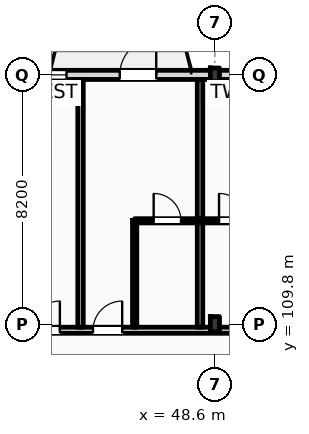
"""IFC4 building model, lengths in metres.
Left out: names, types, materials, properties, quantities, classifications, styles, units other than length and angle.
Written with IfcOpenShell. Run it as: python <this file> out.ifc"""

import sys

from ifc_helpers import new_model, si_unit, direction, frame, frame_2d, origin, origin_2d, place, context, subcontext, project, spatial, rectangle, i_section, extrude, element, fill, save


model = new_model("IFC4")
c1 = context("Model", 3, precision=1e-05, world=origin(), true_north=direction((0.0, 1.0)))
c2 = subcontext(c1, "Body", "Model", "MODEL_VIEW")
j1 = project(units=[si_unit("LENGTHUNIT", "METRE"), si_unit("PLANEANGLEUNIT", "RADIAN")], contexts=[c1])
p1 = place(None, origin())
s1 = spatial("IfcSite", under=j1, at=p1, CompositionType="ELEMENT")
p2 = place(p1, origin())
s2 = spatial("IfcBuilding", under=s1, at=p2, CompositionType="ELEMENT")
p3 = place(p2, frame((0.0, 0.0, 24.6)))
s3 = spatial("IfcBuildingStorey", under=s2, at=p3, CompositionType="ELEMENT", Elevation=24.6)
p4 = place(p3, frame((48.6, 109.8, 0.0), z_axis=(0.0, 0.0, 1.0), x_axis=(1.0, 0.0, 0.0)))
e1 = element("IfcColumn", 1, at=p4, inside=s3, PredefinedType="COLUMN", context=c2, shape_type="SweptSolid", body=[
    extrude(i_section(OverallWidth=0.3, OverallDepth=0.5, WebThickness=0.014, FlangeThickness=0.028, FilletRadius=0.027, at=origin_2d()), origin(), (0.0, 0.0, 1.0), 3.6),
])
p5 = place(p3, frame((48.6, 118.0, 0.0), z_axis=(0.0, 0.0, 1.0), x_axis=(1.0, 0.0, 0.0)))
e2 = element("IfcColumn", 2, at=p5, inside=s3, PredefinedType="COLUMN", context=c2, shape_type="SweptSolid", body=[
    extrude(i_section(OverallWidth=0.3, OverallDepth=0.45, WebThickness=0.014, FlangeThickness=0.026, FilletRadius=0.027, at=origin_2d()), origin(), (0.0, 0.0, 1.0), 3.6),
])
p6 = place(p3, frame((22.5, 118.0, 0.0), z_axis=(0.0, 0.0, 1.0), x_axis=(1.0, 0.0, 0.0)))
e3 = element("IfcWall", 3, at=p6, inside=s3, PredefinedType="STANDARD", context=c2, shape_type="SweptSolid", body=[
    extrude(rectangle(XDim=97.5, YDim=0.3, at=frame_2d((48.75, 0.0))), origin(), (0.0, 0.0, 1.0), 2.78),
])
p7 = place(p6, frame((0.91, 0.0, 0.9)))
e4 = element("IfcOpeningElement", 4, at=p7, cuts=e3, PredefinedType="OPENING", context=c2, shape_type="SweptSolid", body=[
    extrude(rectangle(XDim=0.9, YDim=1.7, at=frame_2d((0.45, 0.85))), frame((0.0, 0.16, 0.0), z_axis=(0.0, -1.0, 0.0), x_axis=(1.0, 0.0, 0.0)), (0.0, 0.0, 1.0), 0.32),
])
p8 = place(p6, frame((6.275, 0.0, 0.0)))
e5 = element("IfcOpeningElement", 5, at=p8, cuts=e3, PredefinedType="OPENING", context=c2, shape_type="SweptSolid", body=[
    extrude(rectangle(XDim=1.2, YDim=2.25, at=frame_2d((0.6, 1.125))), frame((0.0, 0.16, 0.0), z_axis=(0.0, -1.0, 0.0), x_axis=(1.0, 0.0, 0.0)), (0.0, 0.0, 1.0), 0.32),
])
p9 = place(p6, frame((11.42, 0.0, 0.9)))
e6 = element("IfcOpeningElement", 6, at=p9, cuts=e3, PredefinedType="OPENING", context=c2, shape_type="SweptSolid", body=[
    extrude(rectangle(XDim=1.35, YDim=1.7, at=frame_2d((0.675, 0.85))), frame((0.0, 0.16, 0.0), z_axis=(0.0, -1.0, 0.0), x_axis=(1.0, 0.0, 0.0)), (0.0, 0.0, 1.0), 0.32),
])
p10 = place(p6, frame((14.345, 0.0, 0.9)))
e7 = element("IfcOpeningElement", 7, at=p10, cuts=e3, PredefinedType="OPENING", context=c2, shape_type="SweptSolid", body=[
    extrude(rectangle(XDim=1.8, YDim=1.7, at=frame_2d((0.9, 0.85))), frame((0.0, 0.16, 0.0), z_axis=(0.0, -1.0, 0.0), x_axis=(1.0, 0.0, 0.0)), (0.0, 0.0, 1.0), 0.32),
])
p11 = place(p6, frame((19.27, 0.0, 0.9)))
e8 = element("IfcOpeningElement", 8, at=p11, cuts=e3, PredefinedType="OPENING", context=c2, shape_type="SweptSolid", body=[
    extrude(rectangle(XDim=1.95, YDim=1.7, at=frame_2d((0.975, 0.85))), frame((0.0, 0.16, 0.0), z_axis=(0.0, -1.0, 0.0), x_axis=(1.0, 0.0, 0.0)), (0.0, 0.0, 1.0), 0.32),
])
p12 = place(p6, frame((22.97, 0.0, 0.0)))
e9 = element("IfcOpeningElement", 9, at=p12, cuts=e3, PredefinedType="OPENING", context=c2, shape_type="SweptSolid", body=[
    extrude(rectangle(XDim=1.2, YDim=2.25, at=frame_2d((0.6, 1.125))), frame((0.0, 0.16, 0.0), z_axis=(0.0, -1.0, 0.0), x_axis=(1.0, 0.0, 0.0)), (0.0, 0.0, 1.0), 0.32),
])
p13 = place(p6, frame((26.92, 0.0, 0.9)))
e10 = element("IfcOpeningElement", 10, at=p13, cuts=e3, PredefinedType="OPENING", context=c2, shape_type="SweptSolid", body=[
    extrude(rectangle(XDim=2.25, YDim=1.7, at=frame_2d((1.125, 0.85))), frame((0.0, 0.16, 0.0), z_axis=(0.0, -1.0, 0.0), x_axis=(1.0, 0.0, 0.0)), (0.0, 0.0, 1.0), 0.32),
])
p14 = place(p6, frame((30.645, 0.0, 0.9)))
e11 = element("IfcOpeningElement", 11, at=p14, cuts=e3, PredefinedType="OPENING", context=c2, shape_type="SweptSolid", body=[
    extrude(rectangle(XDim=2.4, YDim=1.7, at=frame_2d((1.2, 0.85))), frame((0.0, 0.16, 0.0), z_axis=(0.0, -1.0, 0.0), x_axis=(1.0, 0.0, 0.0)), (0.0, 0.0, 1.0), 0.32),
])
p15 = place(p6, frame((36.71, 0.0, 0.0)))
e12 = element("IfcOpeningElement", 12, at=p15, cuts=e3, PredefinedType="OPENING", context=c2, shape_type="SweptSolid", body=[
    extrude(rectangle(XDim=1.2, YDim=2.25, at=frame_2d((0.6, 1.125))), frame((0.0, 0.16, 0.0), z_axis=(0.0, -1.0, 0.0), x_axis=(1.0, 0.0, 0.0)), (0.0, 0.0, 1.0), 0.32),
])
p16 = place(p6, frame((39.17, 0.0, 0.0)))
e13 = element("IfcOpeningElement", 13, at=p16, cuts=e3, PredefinedType="OPENING", context=c2, shape_type="SweptSolid", body=[
    extrude(rectangle(XDim=1.2, YDim=2.25, at=frame_2d((0.6, 1.125))), frame((0.0, 0.16, 0.0), z_axis=(0.0, -1.0, 0.0), x_axis=(1.0, 0.0, 0.0)), (0.0, 0.0, 1.0), 0.32),
])
p17 = place(p6, frame((43.22, 0.0, 0.9)))
e14 = element("IfcOpeningElement", 14, at=p17, cuts=e3, PredefinedType="OPENING", context=c2, shape_type="SweptSolid", body=[
    extrude(rectangle(XDim=2.85, YDim=1.7, at=frame_2d((1.425, 0.85))), frame((0.0, 0.16, 0.0), z_axis=(0.0, -1.0, 0.0), x_axis=(1.0, 0.0, 0.0)), (0.0, 0.0, 1.0), 0.32),
])
p18 = place(p6, frame((47.29, 0.0, 0.9)))
e15 = element("IfcOpeningElement", 15, at=p18, cuts=e3, PredefinedType="OPENING", context=c2, shape_type="SweptSolid", body=[
    extrude(rectangle(XDim=1.35, YDim=1.7, at=frame_2d((0.675, 0.85))), frame((0.0, 0.16, 0.0), z_axis=(0.0, -1.0, 0.0), x_axis=(1.0, 0.0, 0.0)), (0.0, 0.0, 1.0), 0.32),
])
p19 = place(p6, frame((52.91, 0.0, 0.0)))
e16 = element("IfcOpeningElement", 16, at=p19, cuts=e3, PredefinedType="OPENING", context=c2, shape_type="SweptSolid", body=[
    extrude(rectangle(XDim=1.2, YDim=2.25, at=frame_2d((0.6, 1.125))), frame((0.0, 0.16, 0.0), z_axis=(0.0, -1.0, 0.0), x_axis=(1.0, 0.0, 0.0)), (0.0, 0.0, 1.0), 0.32),
])
p20 = place(p6, frame((55.69, 0.0, 0.9)))
e17 = element("IfcOpeningElement", 17, at=p20, cuts=e3, PredefinedType="OPENING", context=c2, shape_type="SweptSolid", body=[
    extrude(rectangle(XDim=0.9, YDim=1.7, at=frame_2d((0.45, 0.85))), frame((0.0, 0.16, 0.0), z_axis=(0.0, -1.0, 0.0), x_axis=(1.0, 0.0, 0.0)), (0.0, 0.0, 1.0), 0.32),
])
p21 = place(p6, frame((59.82, 0.0, 0.9)))
e18 = element("IfcOpeningElement", 18, at=p21, cuts=e3, PredefinedType="OPENING", context=c2, shape_type="SweptSolid", body=[
    extrude(rectangle(XDim=3.25, YDim=1.7, at=frame_2d((1.625, 0.85))), frame((0.0, 0.16, 0.0), z_axis=(0.0, -1.0, 0.0), x_axis=(1.0, 0.0, 0.0)), (0.0, 0.0, 1.0), 0.32),
])
p22 = place(p6, frame((65.89, 0.0, 0.9)))
e19 = element("IfcOpeningElement", 19, at=p22, cuts=e3, PredefinedType="OPENING", context=c2, shape_type="SweptSolid", body=[
    extrude(rectangle(XDim=1.1, YDim=1.7, at=frame_2d((0.55, 0.85))), frame((0.0, 0.16, 0.0), z_axis=(0.0, -1.0, 0.0), x_axis=(1.0, 0.0, 0.0)), (0.0, 0.0, 1.0), 0.32),
])
p23 = place(p6, frame((69.245, 0.0, 0.0)))
e20 = element("IfcOpeningElement", 20, at=p23, cuts=e3, PredefinedType="OPENING", context=c2, shape_type="SweptSolid", body=[
    extrude(rectangle(XDim=1.2, YDim=2.25, at=frame_2d((0.6, 1.125))), frame((0.0, 0.16, 0.0), z_axis=(0.0, -1.0, 0.0), x_axis=(1.0, 0.0, 0.0)), (0.0, 0.0, 1.0), 0.32),
])
p24 = place(p6, frame((73.69, 0.0, 0.9)))
e21 = element("IfcOpeningElement", 21, at=p24, cuts=e3, PredefinedType="OPENING", context=c2, shape_type="SweptSolid", body=[
    extrude(rectangle(XDim=1.8, YDim=1.7, at=frame_2d((0.9, 0.85))), frame((0.0, 0.16, 0.0), z_axis=(0.0, -1.0, 0.0), x_axis=(1.0, 0.0, 0.0)), (0.0, 0.0, 1.0), 0.32),
])
p25 = place(p6, frame((76.62, 0.0, 0.9)))
e22 = element("IfcOpeningElement", 22, at=p25, cuts=e3, PredefinedType="OPENING", context=c2, shape_type="SweptSolid", body=[
    extrude(rectangle(XDim=3.25, YDim=1.7, at=frame_2d((1.625, 0.85))), frame((0.0, 0.16, 0.0), z_axis=(0.0, -1.0, 0.0), x_axis=(1.0, 0.0, 0.0)), (0.0, 0.0, 1.0), 0.32),
])
p26 = place(p6, frame((81.895, 0.0, 0.9)))
e23 = element("IfcOpeningElement", 23, at=p26, cuts=e3, PredefinedType="OPENING", context=c2, shape_type="SweptSolid", body=[
    extrude(rectangle(XDim=1.1, YDim=1.5, at=frame_2d((0.55, 0.75))), frame((0.0, 0.16, 0.0), z_axis=(0.0, -1.0, 0.0), x_axis=(1.0, 0.0, 0.0)), (0.0, 0.0, 1.0), 0.32),
])
p27 = place(p6, frame((86.02, 0.0, 0.9)))
e24 = element("IfcOpeningElement", 24, at=p27, cuts=e3, PredefinedType="OPENING", context=c2, shape_type="SweptSolid", body=[
    extrude(rectangle(XDim=1.25, YDim=1.6, at=frame_2d((0.625, 0.8))), frame((0.0, 0.16, 0.0), z_axis=(0.0, -1.0, 0.0), x_axis=(1.0, 0.0, 0.0)), (0.0, 0.0, 1.0), 0.32),
])
p28 = place(p6, frame((90.145, 0.0, 0.9)))
e25 = element("IfcOpeningElement", 25, at=p28, cuts=e3, PredefinedType="OPENING", context=c2, shape_type="SweptSolid", body=[
    extrude(rectangle(XDim=1.4, YDim=1.7, at=frame_2d((0.7, 0.85))), frame((0.0, 0.16, 0.0), z_axis=(0.0, -1.0, 0.0), x_axis=(1.0, 0.0, 0.0)), (0.0, 0.0, 1.0), 0.32),
])
p29 = place(p6, frame((94.155, 0.0, 0.9)))
e26 = element("IfcOpeningElement", 26, at=p29, cuts=e3, PredefinedType="OPENING", context=c2, shape_type="SweptSolid", body=[
    extrude(rectangle(XDim=1.6, YDim=1.7, at=frame_2d((0.8, 0.85))), frame((0.0, 0.16, 0.0), z_axis=(0.0, -1.0, 0.0), x_axis=(1.0, 0.0, 0.0)), (0.0, 0.0, 1.0), 0.32),
])
p30 = place(p3, frame((10.65, 109.6, 0.0), z_axis=(0.0, 0.0, 1.0), x_axis=(1.0, 0.0, 0.0)))
e27 = element("IfcWall", 27, at=p30, inside=s3, PredefinedType="PARTITIONING", context=c2, shape_type="SweptSolid", body=[
    extrude(rectangle(XDim=109.21, YDim=0.2, at=frame_2d((54.605, 0.0))), origin(), (0.0, 0.0, 1.0), 2.78),
])
p31 = place(p30, frame((12.705, 0.0, 0.0)))
e28 = element("IfcOpeningElement", 28, at=p31, cuts=e27, PredefinedType="OPENING", context=c2, shape_type="SweptSolid", body=[
    extrude(rectangle(XDim=1.02, YDim=2.2, at=frame_2d((0.51, 1.1))), frame((0.0, 0.11, 0.0), z_axis=(0.0, -1.0, 0.0), x_axis=(1.0, 0.0, 0.0)), (0.0, 0.0, 1.0), 0.22),
])
p32 = place(p30, frame((19.26, 0.0, 0.0)))
e29 = element("IfcOpeningElement", 29, at=p32, cuts=e27, PredefinedType="OPENING", context=c2, shape_type="SweptSolid", body=[
    extrude(rectangle(XDim=1.02, YDim=2.2, at=frame_2d((0.51, 1.1))), frame((0.0, 0.11, 0.0), z_axis=(0.0, -1.0, 0.0), x_axis=(1.0, 0.0, 0.0)), (0.0, 0.0, 1.0), 0.22),
])
p33 = place(p30, frame((23.71, 0.0, 0.0)))
e30 = element("IfcOpeningElement", 30, at=p33, cuts=e27, PredefinedType="OPENING", context=c2, shape_type="SweptSolid", body=[
    extrude(rectangle(XDim=1.02, YDim=2.2, at=frame_2d((0.51, 1.1))), frame((0.0, 0.11, 0.0), z_axis=(0.0, -1.0, 0.0), x_axis=(1.0, 0.0, 0.0)), (0.0, 0.0, 1.0), 0.22),
])
p34 = place(p30, frame((27.66, 0.0, 0.0)))
e31 = element("IfcOpeningElement", 31, at=p34, cuts=e27, PredefinedType="OPENING", context=c2, shape_type="SweptSolid", body=[
    extrude(rectangle(XDim=1.02, YDim=2.2, at=frame_2d((0.51, 1.1))), frame((0.0, 0.11, 0.0), z_axis=(0.0, -1.0, 0.0), x_axis=(1.0, 0.0, 0.0)), (0.0, 0.0, 1.0), 0.22),
])
p35 = place(p30, frame((31.89, 0.0, 0.0)))
e32 = element("IfcOpeningElement", 32, at=p35, cuts=e27, PredefinedType="OPENING", context=c2, shape_type="SweptSolid", body=[
    extrude(rectangle(XDim=0.96, YDim=2.2, at=frame_2d((0.48, 1.1))), frame((0.0, 0.11, 0.0), z_axis=(0.0, -1.0, 0.0), x_axis=(1.0, 0.0, 0.0)), (0.0, 0.0, 1.0), 0.22),
])
p36 = place(p30, frame((33.94, 0.0, 0.0)))
e33 = element("IfcOpeningElement", 33, at=p36, cuts=e27, PredefinedType="OPENING", context=c2, shape_type="SweptSolid", body=[
    extrude(rectangle(XDim=0.96, YDim=2.2, at=frame_2d((0.48, 1.1))), frame((0.0, 0.11, 0.0), z_axis=(0.0, -1.0, 0.0), x_axis=(1.0, 0.0, 0.0)), (0.0, 0.0, 1.0), 0.22),
])
p37 = place(p30, frame((40.29, 0.0, 0.0)))
e34 = element("IfcOpeningElement", 34, at=p37, cuts=e27, PredefinedType="OPENING", context=c2, shape_type="SweptSolid", body=[
    extrude(rectangle(XDim=0.96, YDim=2.2, at=frame_2d((0.48, 1.1))), frame((0.0, 0.11, 0.0), z_axis=(0.0, -1.0, 0.0), x_axis=(1.0, 0.0, 0.0)), (0.0, 0.0, 1.0), 0.22),
])
p38 = place(p30, frame((42.34, 0.0, 0.0)))
e35 = element("IfcOpeningElement", 35, at=p38, cuts=e27, PredefinedType="OPENING", context=c2, shape_type="SweptSolid", body=[
    extrude(rectangle(XDim=0.96, YDim=2.2, at=frame_2d((0.48, 1.1))), frame((0.0, 0.11, 0.0), z_axis=(0.0, -1.0, 0.0), x_axis=(1.0, 0.0, 0.0)), (0.0, 0.0, 1.0), 0.22),
])
p39 = place(p30, frame((48.69, 0.0, 0.0)))
e36 = element("IfcOpeningElement", 36, at=p39, cuts=e27, PredefinedType="OPENING", context=c2, shape_type="SweptSolid", body=[
    extrude(rectangle(XDim=0.96, YDim=2.2, at=frame_2d((0.48, 1.1))), frame((0.0, 0.11, 0.0), z_axis=(0.0, -1.0, 0.0), x_axis=(1.0, 0.0, 0.0)), (0.0, 0.0, 1.0), 0.22),
])
p40 = place(p30, frame((50.74, 0.0, 0.0)))
e37 = element("IfcOpeningElement", 37, at=p40, cuts=e27, PredefinedType="OPENING", context=c2, shape_type="SweptSolid", body=[
    extrude(rectangle(XDim=0.96, YDim=2.2, at=frame_2d((0.48, 1.1))), frame((0.0, 0.11, 0.0), z_axis=(0.0, -1.0, 0.0), x_axis=(1.0, 0.0, 0.0)), (0.0, 0.0, 1.0), 0.22),
])
p41 = place(p30, frame((57.09, 0.0, 0.0)))
e38 = element("IfcOpeningElement", 38, at=p41, cuts=e27, PredefinedType="OPENING", context=c2, shape_type="SweptSolid", body=[
    extrude(rectangle(XDim=0.96, YDim=2.2, at=frame_2d((0.48, 1.1))), frame((0.0, 0.11, 0.0), z_axis=(0.0, -1.0, 0.0), x_axis=(1.0, 0.0, 0.0)), (0.0, 0.0, 1.0), 0.22),
])
p42 = place(p30, frame((59.14, 0.0, 0.0)))
e39 = element("IfcOpeningElement", 39, at=p42, cuts=e27, PredefinedType="OPENING", context=c2, shape_type="SweptSolid", body=[
    extrude(rectangle(XDim=0.96, YDim=2.2, at=frame_2d((0.48, 1.1))), frame((0.0, 0.11, 0.0), z_axis=(0.0, -1.0, 0.0), x_axis=(1.0, 0.0, 0.0)), (0.0, 0.0, 1.0), 0.22),
])
p43 = place(p30, frame((65.49, 0.0, 0.0)))
e40 = element("IfcOpeningElement", 40, at=p43, cuts=e27, PredefinedType="OPENING", context=c2, shape_type="SweptSolid", body=[
    extrude(rectangle(XDim=0.96, YDim=2.2, at=frame_2d((0.48, 1.1))), frame((0.0, 0.11, 0.0), z_axis=(0.0, -1.0, 0.0), x_axis=(1.0, 0.0, 0.0)), (0.0, 0.0, 1.0), 0.22),
])
p44 = place(p30, frame((67.54, 0.0, 0.0)))
e41 = element("IfcOpeningElement", 41, at=p44, cuts=e27, PredefinedType="OPENING", context=c2, shape_type="SweptSolid", body=[
    extrude(rectangle(XDim=0.96, YDim=2.2, at=frame_2d((0.48, 1.1))), frame((0.0, 0.11, 0.0), z_axis=(0.0, -1.0, 0.0), x_axis=(1.0, 0.0, 0.0)), (0.0, 0.0, 1.0), 0.22),
])
p45 = place(p30, frame((73.89, 0.0, 0.0)))
e42 = element("IfcOpeningElement", 42, at=p45, cuts=e27, PredefinedType="OPENING", context=c2, shape_type="SweptSolid", body=[
    extrude(rectangle(XDim=0.96, YDim=2.2, at=frame_2d((0.48, 1.1))), frame((0.0, 0.11, 0.0), z_axis=(0.0, -1.0, 0.0), x_axis=(1.0, 0.0, 0.0)), (0.0, 0.0, 1.0), 0.22),
])
p46 = place(p30, frame((78.09, 0.0, 0.0)))
e43 = element("IfcOpeningElement", 43, at=p46, cuts=e27, PredefinedType="OPENING", context=c2, shape_type="SweptSolid", body=[
    extrude(rectangle(XDim=0.96, YDim=2.2, at=frame_2d((0.48, 1.1))), frame((0.0, 0.11, 0.0), z_axis=(0.0, -1.0, 0.0), x_axis=(1.0, 0.0, 0.0)), (0.0, 0.0, 1.0), 0.22),
])
p47 = place(p30, frame((82.29, 0.0, 0.0)))
e44 = element("IfcOpeningElement", 44, at=p47, cuts=e27, PredefinedType="OPENING", context=c2, shape_type="SweptSolid", body=[
    extrude(rectangle(XDim=0.96, YDim=2.2, at=frame_2d((0.48, 1.1))), frame((0.0, 0.11, 0.0), z_axis=(0.0, -1.0, 0.0), x_axis=(1.0, 0.0, 0.0)), (0.0, 0.0, 1.0), 0.22),
])
p48 = place(p30, frame((86.49, 0.0, 0.0)))
e45 = element("IfcOpeningElement", 45, at=p48, cuts=e27, PredefinedType="OPENING", context=c2, shape_type="SweptSolid", body=[
    extrude(rectangle(XDim=0.96, YDim=2.2, at=frame_2d((0.48, 1.1))), frame((0.0, 0.11, 0.0), z_axis=(0.0, -1.0, 0.0), x_axis=(1.0, 0.0, 0.0)), (0.0, 0.0, 1.0), 0.22),
])
p49 = place(p30, frame((88.54, 0.0, 0.0)))
e46 = element("IfcOpeningElement", 46, at=p49, cuts=e27, PredefinedType="OPENING", context=c2, shape_type="SweptSolid", body=[
    extrude(rectangle(XDim=0.96, YDim=2.2, at=frame_2d((0.48, 1.1))), frame((0.0, 0.11, 0.0), z_axis=(0.0, -1.0, 0.0), x_axis=(1.0, 0.0, 0.0)), (0.0, 0.0, 1.0), 0.22),
])
p50 = place(p30, frame((94.89, 0.0, 0.0)))
e47 = element("IfcOpeningElement", 47, at=p50, cuts=e27, PredefinedType="OPENING", context=c2, shape_type="SweptSolid", body=[
    extrude(rectangle(XDim=0.96, YDim=2.2, at=frame_2d((0.48, 1.1))), frame((0.0, 0.11, 0.0), z_axis=(0.0, -1.0, 0.0), x_axis=(1.0, 0.0, 0.0)), (0.0, 0.0, 1.0), 0.22),
])
p51 = place(p30, frame((96.94, 0.0, 0.0)))
e48 = element("IfcOpeningElement", 48, at=p51, cuts=e27, PredefinedType="OPENING", context=c2, shape_type="SweptSolid", body=[
    extrude(rectangle(XDim=0.96, YDim=2.2, at=frame_2d((0.48, 1.1))), frame((0.0, 0.11, 0.0), z_axis=(0.0, -1.0, 0.0), x_axis=(1.0, 0.0, 0.0)), (0.0, 0.0, 1.0), 0.22),
])
p52 = place(p30, frame((103.29, 0.0, 0.0)))
e49 = element("IfcOpeningElement", 49, at=p52, cuts=e27, PredefinedType="OPENING", context=c2, shape_type="SweptSolid", body=[
    extrude(rectangle(XDim=0.96, YDim=2.2, at=frame_2d((0.48, 1.1))), frame((0.0, 0.11, 0.0), z_axis=(0.0, -1.0, 0.0), x_axis=(1.0, 0.0, 0.0)), (0.0, 0.0, 1.0), 0.22),
])
p53 = place(p30, frame((105.25, 0.0, 0.0)))
e50 = element("IfcOpeningElement", 50, at=p53, cuts=e27, PredefinedType="OPENING", context=c2, shape_type="SweptSolid", body=[
    extrude(rectangle(XDim=0.96, YDim=2.2, at=frame_2d((0.48, 1.1))), frame((0.0, 0.11, 0.0), z_axis=(0.0, -1.0, 0.0), x_axis=(1.0, 0.0, 0.0)), (0.0, 0.0, 1.0), 0.22),
])
p54 = place(p30, frame((2.716, 0.0, 0.0)))
e51 = element("IfcOpeningElement", 51, at=p54, cuts=e27, PredefinedType="OPENING", context=c2, shape_type="SweptSolid", body=[
    extrude(rectangle(XDim=1.35, YDim=2.25, at=frame_2d((0.675, 1.125))), frame((0.0, 0.11, 0.0), z_axis=(0.0, -1.0, 0.0), x_axis=(1.0, 0.0, 0.0)), (0.0, 0.0, 1.0), 0.22),
])
p55 = place(p30, frame((6.65, 0.0, 0.0)))
e52 = element("IfcOpeningElement", 52, at=p55, cuts=e27, PredefinedType="OPENING", context=c2, shape_type="SweptSolid", body=[
    extrude(rectangle(XDim=1.35, YDim=2.25, at=frame_2d((0.675, 1.125))), frame((0.0, 0.11, 0.0), z_axis=(0.0, -1.0, 0.0), x_axis=(1.0, 0.0, 0.0)), (0.0, 0.0, 1.0), 0.22),
])
p56 = place(p30, frame((10.583, 0.0, 0.0)))
e53 = element("IfcOpeningElement", 53, at=p56, cuts=e27, PredefinedType="OPENING", context=c2, shape_type="SweptSolid", body=[
    extrude(rectangle(XDim=1.35, YDim=2.25, at=frame_2d((0.675, 1.125))), frame((0.0, 0.11, 0.0), z_axis=(0.0, -1.0, 0.0), x_axis=(1.0, 0.0, 0.0)), (0.0, 0.0, 1.0), 0.22),
])
for number, where, z_axis, x_axis in (
    (54, (44.18, 109.7, 0.0), (0.0, 0.0, 1.0), (0.0, 1.0, 0.0)),
    (55, (48.11, 109.7, 0.0), (0.0, 0.0, 1.0), (0.0, 1.0, 0.0)),
):
    element("IfcWall", number, at=place(p3, frame(where, z_axis=z_axis, x_axis=x_axis)), inside=s3, PredefinedType="PARTITIONING", context=c2, shape_type="SweptSolid", body=[
        extrude(rectangle(XDim=8.15, YDim=0.18, at=frame_2d((4.075, 0.0))), origin(), (0.0, 0.0, 1.0), 3.34),
    ])
p57 = place(p3, frame((45.96, 109.7, 0.0), z_axis=(0.0, 0.0, 1.0), x_axis=(0.0, 1.0, 0.0)))
e56 = element("IfcWall", 56, at=p57, inside=s3, PredefinedType="PARTITIONING", context=c2, shape_type="SweptSolid", body=[
    extrude(rectangle(XDim=3.5, YDim=0.14, at=frame_2d((1.75, 0.0))), origin(), (0.0, 0.0, 1.0), 3.03),
])
p58 = place(p3, frame((45.96, 113.2, 0.0), z_axis=(0.0, 0.0, 1.0), x_axis=(1.0, 0.0, 0.0)))
e57 = element("IfcWall", 57, at=p58, inside=s3, PredefinedType="PARTITIONING", context=c2, shape_type="SweptSolid", body=[
    extrude(rectangle(XDim=2.15, YDim=0.14, at=frame_2d((1.075, 0.0))), origin(), (0.0, 0.0, 1.0), 3.34),
])
p59 = place(p58, frame((0.625, 0.0, 0.0)))
e58 = element("IfcOpeningElement", 58, at=p59, cuts=e57, PredefinedType="OPENING", context=c2, shape_type="SweptSolid", body=[
    extrude(rectangle(XDim=0.9, YDim=2.1, at=frame_2d((0.45, 1.05))), frame((0.0, 0.08, 0.0), z_axis=(0.0, -1.0, 0.0), x_axis=(1.0, 0.0, 0.0)), (0.0, 0.0, 1.0), 0.16),
])
p60 = place(p3, frame((48.11, 113.2, 0.0), z_axis=(0.0, 0.0, 1.0), x_axis=(1.0, 0.0, 0.0)))
e59 = element("IfcWall", 59, at=p60, inside=s3, PredefinedType="PARTITIONING", context=c2, shape_type="SweptSolid", body=[
    extrude(rectangle(XDim=2.15, YDim=0.14, at=frame_2d((1.075, 0.0))), origin(), (0.0, 0.0, 1.0), 3.34),
])
p61 = place(p60, frame((0.625, 0.0, 0.0)))
e60 = element("IfcOpeningElement", 60, at=p61, cuts=e59, PredefinedType="OPENING", context=c2, shape_type="SweptSolid", body=[
    extrude(rectangle(XDim=0.9, YDim=2.1, at=frame_2d((0.45, 1.05))), frame((0.0, 0.08, 0.0), z_axis=(0.0, -1.0, 0.0), x_axis=(1.0, 0.0, 0.0)), (0.0, 0.0, 1.0), 0.16),
])
p62 = place(p11, origin())
e61 = element("IfcWindow", 61, at=p62, inside=s3, PartitioningType="DOUBLE_PANEL_VERTICAL", PredefinedType="WINDOW", context=c2, shape_type="SweptSolid", body=[
    extrude(rectangle(XDim=1.95, YDim=1.7, at=frame_2d((0.975, 0.85))), frame((0.0, 0.03, 0.0), z_axis=(0.0, -1.0, 0.0), x_axis=(1.0, 0.0, 0.0)), (0.0, 0.0, 1.0), 0.06),
])
fill(e8, e61)
p63 = place(p12, origin())
e62 = element("IfcDoor", 62, at=p63, inside=s3, OperationType="SINGLE_SWING_RIGHT", PredefinedType="DOOR", context=c2, shape_type="SweptSolid", body=[
    extrude(rectangle(XDim=1.2, YDim=2.25, at=frame_2d((0.6, 1.125))), frame((0.0, 0.025, 0.0), z_axis=(0.0, -1.0, 0.0), x_axis=(1.0, 0.0, 0.0)), (0.0, 0.0, 1.0), 0.05),
])
fill(e9, e62)
p64 = place(p35, origin())
e63 = element("IfcDoor", 63, at=p64, inside=s3, OperationType="SINGLE_SWING_RIGHT", PredefinedType="DOOR", context=c2, shape_type="SweptSolid", body=[
    extrude(rectangle(XDim=0.96, YDim=2.2, at=frame_2d((0.48, 1.1))), frame((0.0, 0.025, 0.0), z_axis=(0.0, -1.0, 0.0), x_axis=(1.0, 0.0, 0.0)), (0.0, 0.0, 1.0), 0.05),
])
fill(e32, e63)
p65 = place(p36, origin())
e64 = element("IfcDoor", 64, at=p65, inside=s3, OperationType="SINGLE_SWING_RIGHT", PredefinedType="DOOR", context=c2, shape_type="SweptSolid", body=[
    extrude(rectangle(XDim=0.96, YDim=2.2, at=frame_2d((0.48, 1.1))), frame((0.0, 0.025, 0.0), z_axis=(0.0, -1.0, 0.0), x_axis=(1.0, 0.0, 0.0)), (0.0, 0.0, 1.0), 0.05),
])
fill(e33, e64)
p66 = place(p59, origin())
e65 = element("IfcDoor", 65, at=p66, inside=s3, OperationType="SINGLE_SWING_LEFT", PredefinedType="DOOR", context=c2, shape_type="SweptSolid", body=[
    extrude(rectangle(XDim=0.9, YDim=2.1, at=frame_2d((0.45, 1.05))), frame((0.0, 0.025, 0.0), z_axis=(0.0, -1.0, 0.0), x_axis=(1.0, 0.0, 0.0)), (0.0, 0.0, 1.0), 0.05),
])
fill(e58, e65)
p67 = place(p61, origin())
e66 = element("IfcDoor", 66, at=p67, inside=s3, OperationType="SINGLE_SWING_LEFT", PredefinedType="DOOR", context=c2, shape_type="SweptSolid", body=[
    extrude(rectangle(XDim=0.9, YDim=2.1, at=frame_2d((0.45, 1.05))), frame((0.0, 0.025, 0.0), z_axis=(0.0, -1.0, 0.0), x_axis=(1.0, 0.0, 0.0)), (0.0, 0.0, 1.0), 0.05),
])
fill(e60, e66)
save(model, sys.argv[1])
